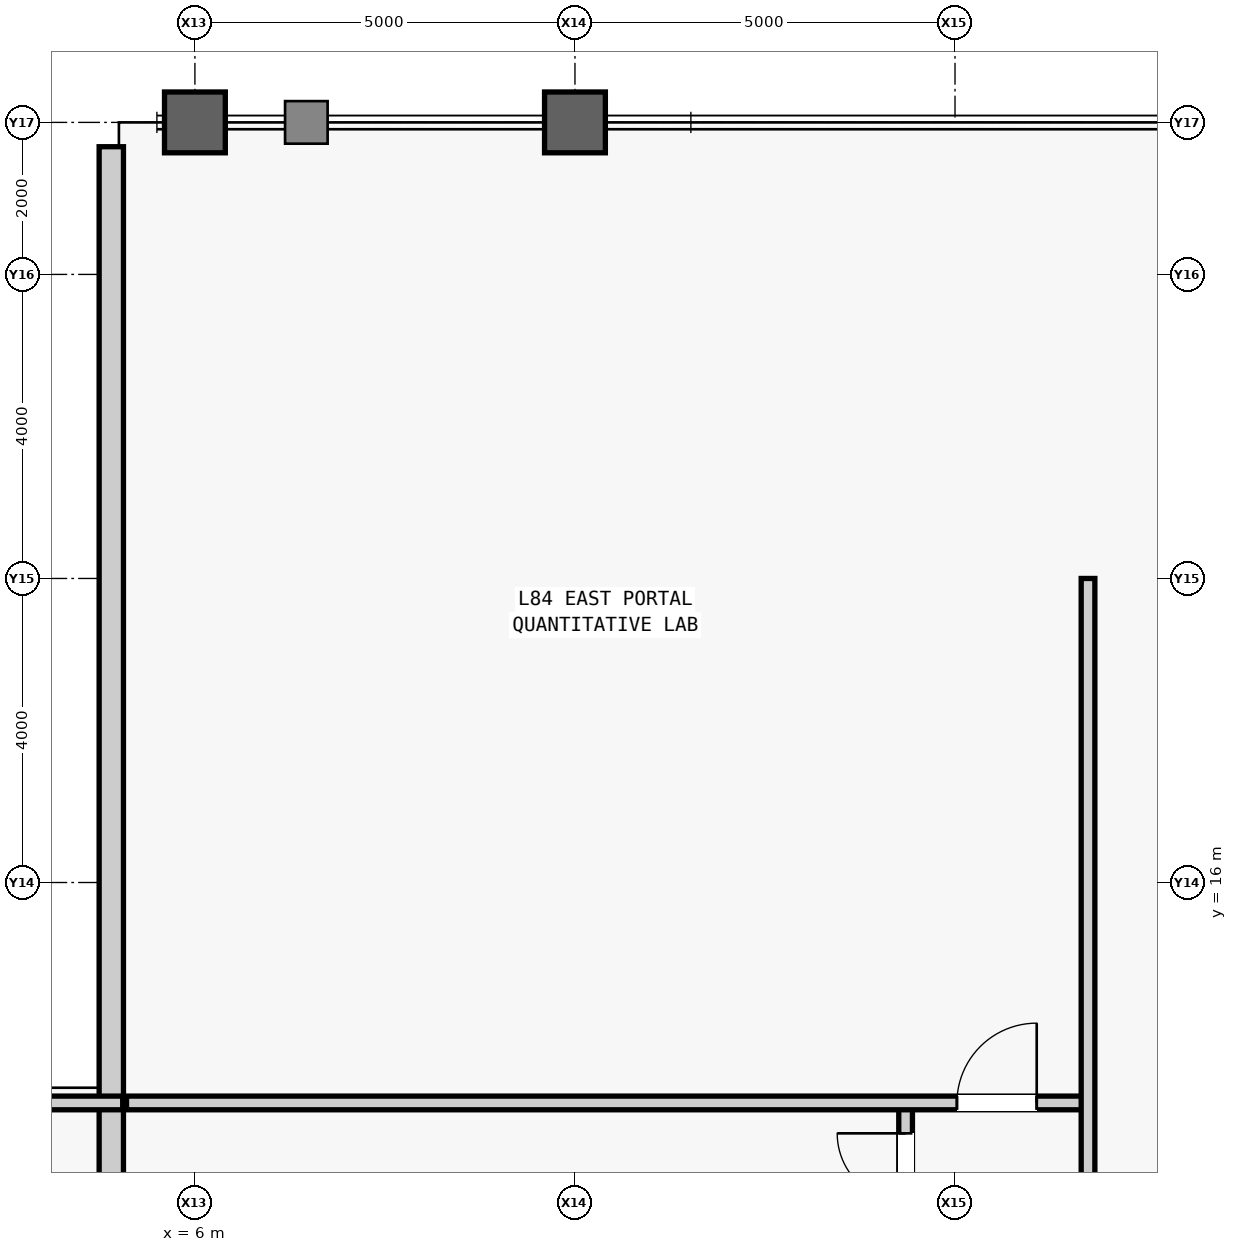
"""IFC4 building model, lengths in metres.
Left out: names, types, materials, properties, quantities, classifications, styles, units other than length and angle.
Written with IfcOpenShell. Run it as: python <this file> out.ifc"""

import sys

from ifc_helpers import new_model, si_unit, direction, frame, frame_2d, origin, origin_2d, place, context, subcontext, project, spatial, rectangle, hollow_rectangle, extrude, source, transform, mapped, element, fill, save


model = new_model("IFC4")
c1 = context("Model", 3, precision=1e-05, world=origin(), true_north=direction((0.0, 1.0)))
c2 = subcontext(c1, "Body", "Model", "MODEL_VIEW")
j1 = project(units=[si_unit("LENGTHUNIT", "METRE"), si_unit("PLANEANGLEUNIT", "RADIAN")], contexts=[c1])
p1 = place(None, origin())
s1 = spatial("IfcSite", under=j1, at=p1, CompositionType="ELEMENT")
p2 = place(p1, origin())
s2 = spatial("IfcBuilding", under=s1, at=p2, CompositionType="ELEMENT")
p3 = place(p2, frame((0.0, 0.0, 354.3)))
s3 = spatial("IfcBuildingStorey", under=s2, at=p3, CompositionType="ELEMENT", Elevation=354.3)
m1 = source(origin(), c2, "Body", "SweptSolid", [
    extrude(hollow_rectangle(XDim=0.8, YDim=0.8, WallThickness=0.045, at=origin_2d()), origin(), (0.0, 0.0, 1.0), 4.0),
])
for number, where, z_axis, x_axis in (
    (1, (6.0, 26.0, 0.0), (0.0, 0.0, 1.0), (1.0, 0.0, 0.0)),
    (2, (11.0, 26.0, 0.0), (0.0, 0.0, 1.0), (1.0, 0.0, 0.0)),
):
    element("IfcColumn", number, at=place(p3, frame(where, z_axis=z_axis, x_axis=x_axis)), inside=s3, PredefinedType="COLUMN", context=c2, shape_type="MappedRepresentation", body=[
        mapped(m1, transform((0.0, 0.0, 0.0), scale=1.0)),
    ])
m2 = source(origin(), c2, "Body", "SweptSolid", [
    extrude(rectangle(XDim=14.98, YDim=0.32, at=frame_2d((7.49, 0.0))), origin(), (0.0, 0.0, 1.0), 3.045),
])
p4 = place(p3, frame((4.9, 10.7, 0.0), z_axis=(0.0, 0.0, 1.0), x_axis=(0.0, 1.0, 0.0)))
e3 = element("IfcWall", 3, at=p4, inside=s3, PredefinedType="STANDARD", context=c2, shape_type="MappedRepresentation", body=[
    mapped(m2, transform((0.0, 0.0, 0.0), scale=1.0)),
])
m3 = source(origin(), c2, "Body", "SweptSolid", [
    extrude(rectangle(XDim=9.95, YDim=0.18, at=frame_2d((4.975, 0.0))), origin(), (0.0, 0.0, 1.0), 3.74),
])
p5 = place(p3, frame((-4.9, 13.1, 0.0), z_axis=(0.0, 0.0, 1.0), x_axis=(1.0, 0.0, 0.0)))
e4 = element("IfcWall", 4, at=p5, inside=s3, PredefinedType="PARTITIONING", context=c2, shape_type="MappedRepresentation", body=[
    mapped(m3, transform((0.0, 0.0, 0.0), scale=1.0)),
])
m4 = source(origin(), c2, "Body", "SweptSolid", [
    extrude(rectangle(XDim=2.6, YDim=0.18, at=frame_2d((1.3, 0.0))), origin(), (0.0, 0.0, 1.0), 3.74),
])
p6 = place(p3, frame((15.35, 10.5, 0.0), z_axis=(0.0, 0.0, 1.0), x_axis=(0.0, 1.0, 0.0)))
e5 = element("IfcWall", 5, at=p6, inside=s3, PredefinedType="PARTITIONING", context=c2, shape_type="MappedRepresentation", body=[
    mapped(m4, transform((0.0, 0.0, 0.0), scale=1.0)),
])
m5 = source(origin(), c2, "Body", "SweptSolid", [
    extrude(rectangle(XDim=1.8, YDim=2.25, at=frame_2d((0.9, 1.125))), frame((0.0, 0.1, 0.0), z_axis=(0.0, -1.0, 0.0), x_axis=(1.0, 0.0, 0.0)), (0.0, 0.0, 1.0), 0.2),
])
p7 = place(p6, frame((0.4, 0.0, 0.0)))
e6 = element("IfcOpeningElement", 6, at=p7, cuts=e5, PredefinedType="OPENING", context=c2, shape_type="MappedRepresentation", body=[
    mapped(m5, transform((0.0, 0.0, 0.0), scale=1.0)),
])
m6 = source(origin(), c2, "Body", "SweptSolid", [
    extrude(rectangle(XDim=12.65, YDim=0.18, at=frame_2d((6.325, 0.0))), origin(), (0.0, 0.0, 1.0), 3.74),
])
p8 = place(p3, frame((5.1, 13.1, 0.0), z_axis=(0.0, 0.0, 1.0), x_axis=(1.0, 0.0, 0.0)))
e7 = element("IfcWall", 7, at=p8, inside=s3, PredefinedType="PARTITIONING", context=c2, shape_type="MappedRepresentation", body=[
    mapped(m6, transform((0.0, 0.0, 0.0), scale=1.0)),
])
m7 = source(origin(), c2, "Body", "SweptSolid", [
    extrude(rectangle(XDim=1.05, YDim=2.2, at=frame_2d((0.525, 1.1))), frame((0.0, 0.1, 0.0), z_axis=(0.0, -1.0, 0.0), x_axis=(1.0, 0.0, 0.0)), (0.0, 0.0, 1.0), 0.2),
])
p9 = place(p8, frame((10.925, 0.0, 0.0)))
e8 = element("IfcOpeningElement", 8, at=p9, cuts=e7, PredefinedType="OPENING", context=c2, shape_type="MappedRepresentation", body=[
    mapped(m7, transform((0.0, 0.0, 0.0), scale=1.0)),
])
m8 = source(origin(), c2, "Body", "SweptSolid", [
    extrude(rectangle(XDim=40.0, YDim=0.18, at=frame_2d((20.0, 0.0))), origin(), (0.0, 0.0, 1.0), 3.74),
])
p10 = place(p3, frame((17.75, -20.0, 0.0), z_axis=(0.0, 0.0, 1.0), x_axis=(0.0, 1.0, 0.0)))
e9 = element("IfcWall", 9, at=p10, inside=s3, PredefinedType="PARTITIONING", context=c2, shape_type="MappedRepresentation", body=[
    mapped(m8, transform((0.0, 0.0, 0.0), scale=1.0)),
])
m9 = source(origin(), c2, "Body", "SweptSolid", [
    extrude(rectangle(XDim=0.95, YDim=2.15, at=frame_2d((0.475, 1.075))), frame((0.0, 0.1, 0.0), z_axis=(0.0, -1.0, 0.0), x_axis=(1.0, 0.0, 0.0)), (0.0, 0.0, 1.0), 0.2),
])
p11 = place(p10, frame((11.161, 0.0, 0.0)))
e10 = element("IfcOpeningElement", 10, at=p11, cuts=e9, PredefinedType="OPENING", context=c2, shape_type="MappedRepresentation", body=[
    mapped(m9, transform((0.0, 0.0, 0.0), scale=1.0)),
])
p12 = place(p10, frame((16.789, 0.0, 0.0)))
e11 = element("IfcOpeningElement", 11, at=p12, cuts=e9, PredefinedType="OPENING", context=c2, shape_type="MappedRepresentation", body=[
    mapped(m9, transform((0.0, 0.0, 0.0), scale=1.0)),
])
p13 = place(p10, frame((22.945, 0.0, 0.0)))
e12 = element("IfcOpeningElement", 12, at=p13, cuts=e9, PredefinedType="OPENING", context=c2, shape_type="MappedRepresentation", body=[
    mapped(m9, transform((0.0, 0.0, 0.0), scale=1.0)),
])
p14 = place(p10, frame((28.967, 0.0, 0.0)))
e13 = element("IfcOpeningElement", 13, at=p14, cuts=e9, PredefinedType="OPENING", context=c2, shape_type="MappedRepresentation", body=[
    mapped(m9, transform((0.0, 0.0, 0.0), scale=1.0)),
])
m10 = source(origin(), c2, "Body", "SweptSolid", [
    extrude(rectangle(XDim=1.8, YDim=2.25, at=frame_2d((0.9, 1.125))), frame((0.0, 0.025, 0.0), z_axis=(0.0, -1.0, 0.0), x_axis=(1.0, 0.0, 0.0)), (0.0, 0.0, 1.0), 0.05),
])
p15 = place(p7, origin())
e14 = element("IfcDoor", 14, at=p15, inside=s3, OperationType="DOUBLE_DOOR_SINGLE_SWING", PredefinedType="DOOR", context=c2, shape_type="MappedRepresentation", body=[
    mapped(m10, transform((0.0, 0.0, 0.0), scale=1.0)),
])
fill(e6, e14)
m11 = source(origin(), c2, "Body", "SweptSolid", [
    extrude(rectangle(XDim=1.05, YDim=2.2, at=frame_2d((0.525, 1.1))), frame((0.0, 0.025, 0.0), z_axis=(0.0, -1.0, 0.0), x_axis=(1.0, 0.0, 0.0)), (0.0, 0.0, 1.0), 0.05),
])
p16 = place(p9, origin())
e15 = element("IfcDoor", 15, at=p16, inside=s3, OperationType="SINGLE_SWING_RIGHT", PredefinedType="DOOR", context=c2, shape_type="MappedRepresentation", body=[
    mapped(m11, transform((0.0, 0.0, 0.0), scale=1.0)),
])
fill(e8, e15)
save(model, sys.argv[1])
